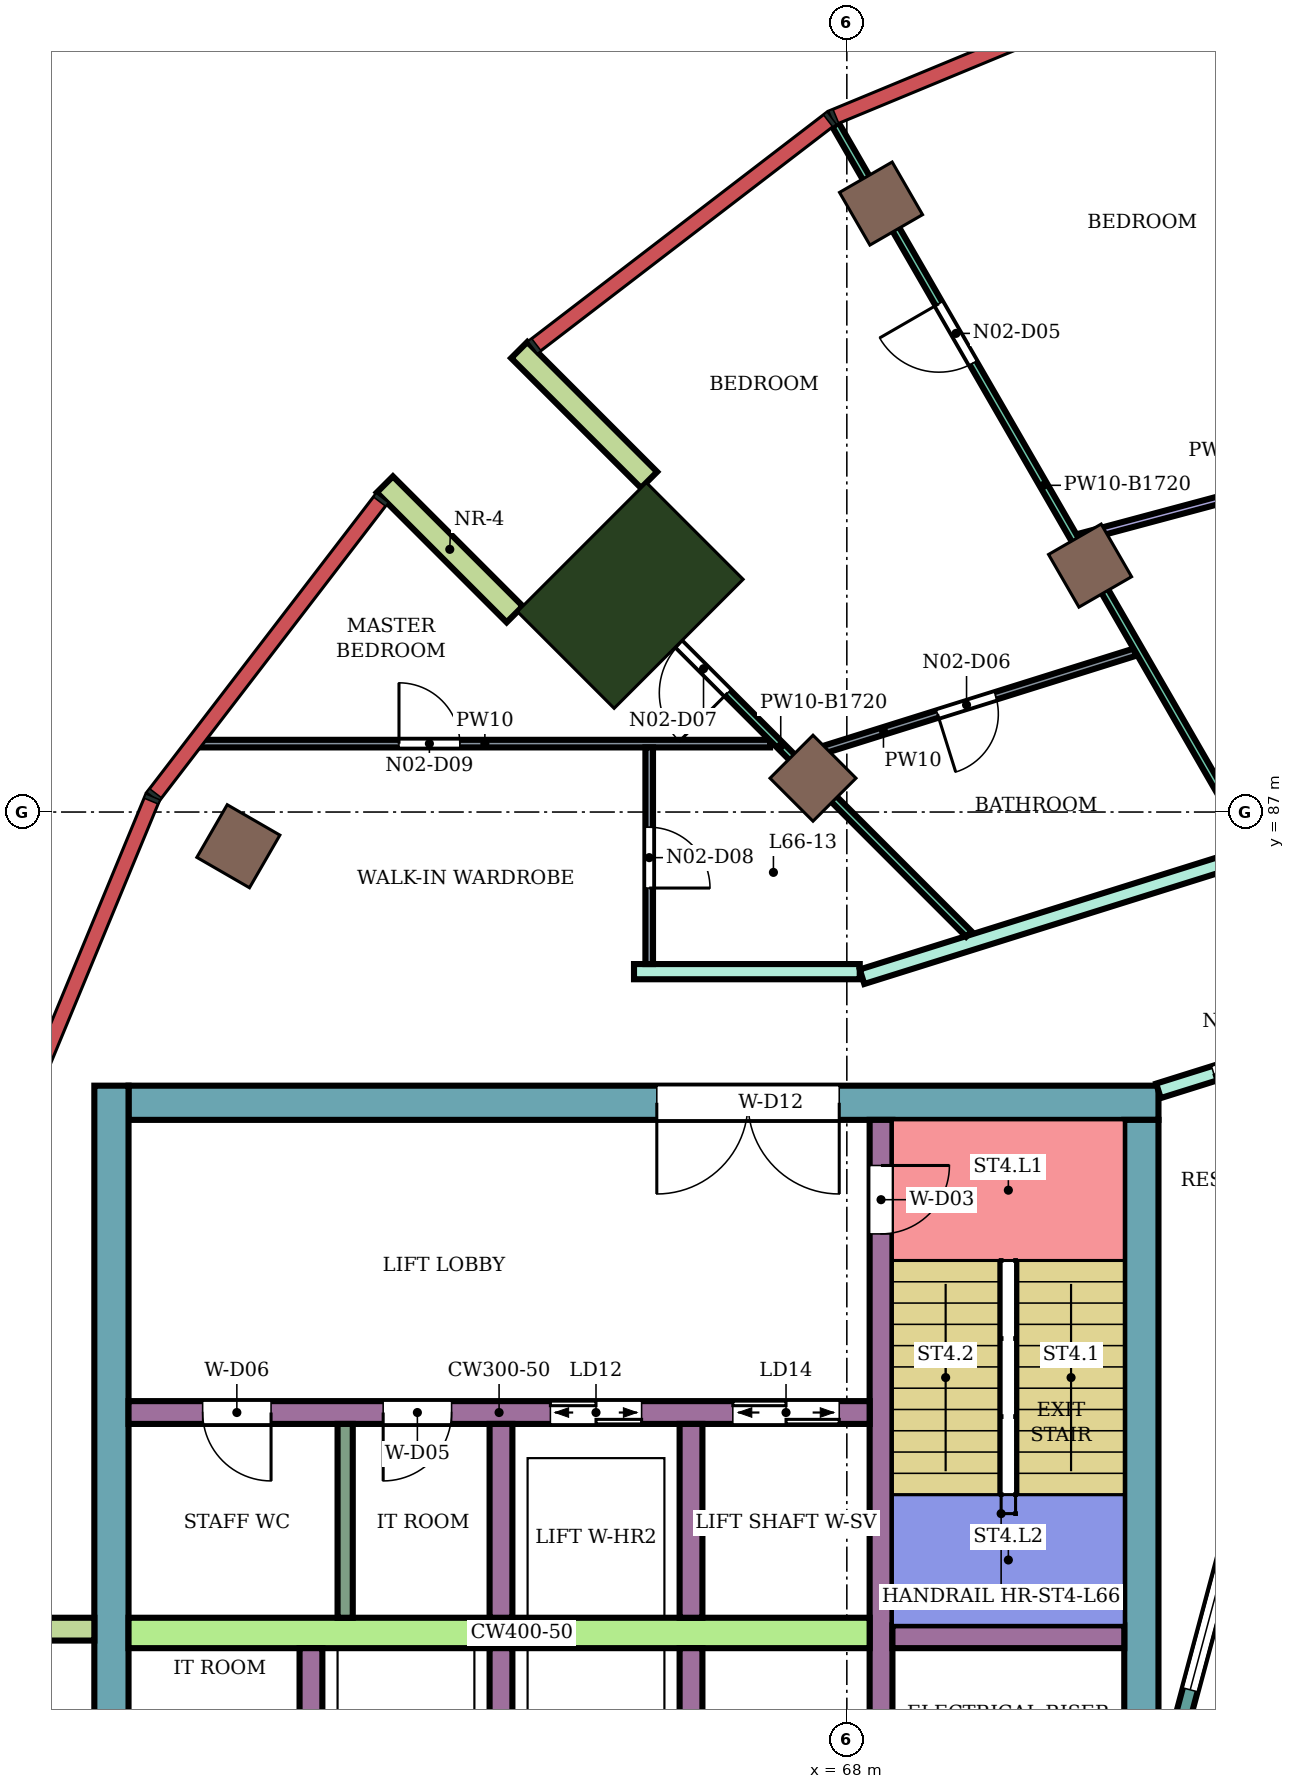
"""IFC4 building model, lengths in metres.
Left out: names, types, materials, properties, quantities, classifications, styles, units other than length and angle.
Written with IfcOpenShell. Run it as: python <this file> out.ifc"""

import sys

from ifc_helpers import new_model, si_unit, direction, frame, frame_2d, origin, origin_2d, place, context, subcontext, project, spatial, rectangle, extrude, element, fill, save


model = new_model("IFC4")
c1 = context("Model", 3, precision=1e-05, world=origin(), true_north=direction((0.0, 1.0)))
c2 = subcontext(c1, "Body", "Model", "MODEL_VIEW")
j1 = project(units=[si_unit("LENGTHUNIT", "METRE"), si_unit("PLANEANGLEUNIT", "RADIAN")], contexts=[c1])
p1 = place(None, origin())
s1 = spatial("IfcSite", under=j1, at=p1, CompositionType="ELEMENT")
p2 = place(p1, origin())
s2 = spatial("IfcBuilding", under=s1, at=p2, CompositionType="ELEMENT")
p3 = place(p2, frame((0.0, 0.0, 288.3)))
s3 = spatial("IfcBuildingStorey", under=s2, at=p3, CompositionType="ELEMENT", Elevation=288.3)
for number, where, z_axis, x_axis in (
    (1, (68.45, 95.005, 0.0), (0.0, 0.0, 1.0), (-0.5, 0.866, 0.0)),
    (2, (59.995, 86.55, 0.0), (0.0, 0.0, 1.0), (-0.866, 0.5, 0.0)),
    (3, (71.2, 90.242, 0.0), (0.0, 0.0, 1.0), (-0.5, 0.866, 0.0)),
    (4, (67.555, 87.445, 0.0), (0.0, 0.0, 1.0), (-0.707, 0.707, 0.0)),
):
    element("IfcColumn", number, at=place(p3, frame(where, z_axis=z_axis, x_axis=x_axis)), inside=s3, PredefinedType="COLUMN", context=c2, shape_type="SweptSolid", body=[
        extrude(rectangle(XDim=0.8, YDim=0.8, at=origin_2d()), origin(), (0.0, 0.0, 1.0), 4.2),
    ])
p4 = place(p3, frame((65.151, 89.849, 0.0), z_axis=(0.0, 0.0, 1.0), x_axis=(-0.707106781187, 0.707106781187, 0.0)))
e5 = element("IfcColumn", 5, at=p4, inside=s3, PredefinedType="COLUMN", context=c2, shape_type="SweptSolid", body=[
    extrude(rectangle(XDim=1.8, YDim=2.4, at=origin_2d()), origin(), (0.0, 0.0, 1.0), 4.2),
])
p5 = place(p3, frame((72.1, 83.175, 0.0), z_axis=(0.0, 0.0, 1.0), x_axis=(-1.0, 0.0, 0.0)))
e6 = element("IfcWall", 6, at=p5, inside=s3, PredefinedType="SHEAR", context=c2, shape_type="SweptSolid", body=[
    extrude(rectangle(XDim=13.55, YDim=0.45, at=frame_2d((6.775, 0.0))), origin(), (0.0, 0.0, 1.0), 3.88),
])
p6 = place(p5, frame((4.2, 0.0, 0.0)))
e7 = element("IfcOpeningElement", 7, at=p6, cuts=e6, PredefinedType="OPENING", context=c2, shape_type="SweptSolid", body=[
    extrude(rectangle(XDim=2.4, YDim=2.4, at=frame_2d((1.2, 1.2))), frame((0.0, 0.235, 0.0), z_axis=(0.0, -1.0, 0.0), x_axis=(1.0, 0.0, 0.0)), (0.0, 0.0, 1.0), 0.47),
])
p7 = place(p3, frame((71.875, 82.95, 0.0), z_axis=(0.0, 0.0, 1.0), x_axis=(0.0, -1.0, 0.0)))
e8 = element("IfcWall", 8, at=p7, inside=s3, PredefinedType="SHEAR", context=c2, shape_type="SweptSolid", body=[
    extrude(rectangle(XDim=7.95, YDim=0.45, at=frame_2d((3.975, 0.0))), origin(), (0.0, 0.0, 1.0), 3.88),
])
p8 = place(p3, frame((58.325, 83.4, 0.0), z_axis=(0.0, 0.0, 1.0), x_axis=(0.0, -1.0, 0.0)))
e9 = element("IfcWall", 9, at=p8, inside=s3, PredefinedType="SHEAR", context=c2, shape_type="SweptSolid", body=[
    extrude(rectangle(XDim=16.8, YDim=0.45, at=frame_2d((8.4, 0.0))), origin(), (0.0, 0.0, 1.0), 3.88),
])
p9 = place(p3, frame((68.45, 82.95, 0.0), z_axis=(0.0, 0.0, 1.0), x_axis=(0.0, -1.0, 0.0)))
e10 = element("IfcWall", 10, at=p9, inside=s3, PredefinedType="SHEAR", context=c2, shape_type="SweptSolid", body=[
    extrude(rectangle(XDim=7.95, YDim=0.3, at=frame_2d((3.975, 0.0))), origin(), (0.0, 0.0, 1.0), 3.88),
])
p10 = place(p9, frame((0.6, 0.0, 0.0)))
e11 = element("IfcOpeningElement", 11, at=p10, cuts=e10, PredefinedType="OPENING", context=c2, shape_type="SweptSolid", body=[
    extrude(rectangle(XDim=0.9, YDim=2.1, at=frame_2d((0.45, 1.05))), frame((0.0, 0.16, 0.0), z_axis=(0.0, -1.0, 0.0), x_axis=(1.0, 0.0, 0.0)), (0.0, 0.0, 1.0), 0.32),
])
p11 = place(p3, frame((71.65, 76.15, 0.0), z_axis=(0.0, 0.0, 1.0), x_axis=(-1.0, 0.0, 0.0)))
e12 = element("IfcWall", 12, at=p11, inside=s3, PredefinedType="SHEAR", context=c2, shape_type="SweptSolid", body=[
    extrude(rectangle(XDim=3.05, YDim=0.3, at=frame_2d((1.525, 0.0))), origin(), (0.0, 0.0, 1.0), 3.88),
])
p12 = place(p3, frame((68.3, 76.2, 0.0), z_axis=(0.0, 0.0, 1.0), x_axis=(-1.0, 0.0, 0.0)))
e13 = element("IfcWall", 13, at=p12, inside=s3, PredefinedType="SHEAR", context=c2, shape_type="SweptSolid", body=[
    extrude(rectangle(XDim=9.75, YDim=0.4, at=frame_2d((4.875, 0.0))), origin(), (0.0, 0.0, 1.0), 3.88),
])
p13 = place(p3, frame((68.3, 79.1, 0.0), z_axis=(0.0, 0.0, 1.0), x_axis=(-1.0, 0.0, 0.0)))
e14 = element("IfcWall", 14, at=p13, inside=s3, PredefinedType="SHEAR", context=c2, shape_type="SweptSolid", body=[
    extrude(rectangle(XDim=9.75, YDim=0.3, at=frame_2d((4.875, 0.0))), origin(), (0.0, 0.0, 1.0), 3.88),
])
p14 = place(p13, frame((0.4, 0.0, 0.0)))
e15 = element("IfcOpeningElement", 15, at=p14, cuts=e14, PredefinedType="OPENING", context=c2, shape_type="SweptSolid", body=[
    extrude(rectangle(XDim=1.4, YDim=2.1, at=frame_2d((0.7, 1.05))), frame((0.0, 0.16, 0.0), z_axis=(0.0, -1.0, 0.0), x_axis=(1.0, 0.0, 0.0)), (0.0, 0.0, 1.0), 0.32),
])
p15 = place(p13, frame((3.0, 0.0, 0.0)))
e16 = element("IfcOpeningElement", 16, at=p15, cuts=e14, PredefinedType="OPENING", context=c2, shape_type="SweptSolid", body=[
    extrude(rectangle(XDim=1.2, YDim=2.1, at=frame_2d((0.6, 1.05))), frame((0.0, 0.16, 0.0), z_axis=(0.0, -1.0, 0.0), x_axis=(1.0, 0.0, 0.0)), (0.0, 0.0, 1.0), 0.32),
])
p16 = place(p13, frame((5.5, 0.0, 0.0)))
e17 = element("IfcOpeningElement", 17, at=p16, cuts=e14, PredefinedType="OPENING", context=c2, shape_type="SweptSolid", body=[
    extrude(rectangle(XDim=0.9, YDim=2.1, at=frame_2d((0.45, 1.05))), frame((0.0, 0.16, 0.0), z_axis=(0.0, -1.0, 0.0), x_axis=(1.0, 0.0, 0.0)), (0.0, 0.0, 1.0), 0.32),
])
p17 = place(p13, frame((7.875, 0.0, 0.0)))
e18 = element("IfcOpeningElement", 18, at=p17, cuts=e14, PredefinedType="OPENING", context=c2, shape_type="SweptSolid", body=[
    extrude(rectangle(XDim=0.9, YDim=2.1, at=frame_2d((0.45, 1.05))), frame((0.0, 0.16, 0.0), z_axis=(0.0, -1.0, 0.0), x_axis=(1.0, 0.0, 0.0)), (0.0, 0.0, 1.0), 0.32),
])
for number, where, z_axis, x_axis in (
    (19, (65.95, 76.0, 0.0), (0.0, 0.0, 1.0), (0.0, -1.0, 0.0)),
    (20, (63.45, 76.0, 0.0), (0.0, 0.0, 1.0), (0.0, -1.0, 0.0)),
    (21, (60.95, 76.0, 0.0), (0.0, 0.0, 1.0), (0.0, -1.0, 0.0)),
    (22, (65.95, 78.95, 0.0), (0.0, 0.0, 1.0), (0.0, -1.0, 0.0)),
    (23, (63.45, 78.95, 0.0), (0.0, 0.0, 1.0), (0.0, -1.0, 0.0)),
):
    element("IfcWall", number, at=place(p3, frame(where, z_axis=z_axis, x_axis=x_axis)), inside=s3, PredefinedType="SHEAR", context=c2, shape_type="SweptSolid", body=[
        extrude(rectangle(XDim=2.55, YDim=0.3, at=frame_2d((1.275, 0.0))), origin(), (0.0, 0.0, 1.0), 3.88),
    ])
for number, where, z_axis, x_axis in (
    (24, (65.398, 91.37, 0.0), (0.0, 0.0, 1.0), (-0.707, 0.707, 0.0)),
    (25, (63.63, 89.602, 0.0), (0.0, 0.0, 1.0), (-0.707, 0.707, 0.0)),
):
    element("IfcWall", number, at=place(p3, frame(where, z_axis=z_axis, x_axis=x_axis)), inside=s3, PredefinedType="NOTDEFINED", context=c2, shape_type="SweptSolid", body=[
        extrude(rectangle(XDim=2.416, YDim=0.3, at=frame_2d((1.208, 0.0))), origin(), (0.0, 0.0, 1.0), 4.2),
    ])
p18 = place(p3, frame((58.1, 76.25, 0.0), z_axis=(0.0, 0.0, 1.0), x_axis=(-1.0, 0.0, 0.0)))
e26 = element("IfcWall", 26, at=p18, inside=s3, PredefinedType="NOTDEFINED", context=c2, shape_type="SweptSolid", body=[
    extrude(rectangle(XDim=2.416, YDim=0.3, at=frame_2d((1.208, 0.0))), origin(), (0.0, 0.0, 1.0), 4.2),
])
p19 = place(p3, frame((73.415, 78.802, 0.0), z_axis=(0.0, 0.0, 1.0), x_axis=(-0.258789828301, -0.965933654434, 0.0)))
e27 = element("IfcWall", 27, at=p19, inside=s3, PredefinedType="NOTDEFINED", context=c2, shape_type="SweptSolid", body=[
    extrude(rectangle(XDim=3.936, YDim=0.2, at=frame_2d((1.968, 0.0))), origin(), (0.0, 0.0, 1.0), 4.2),
])
p20 = place(p19, frame((0.468, 0.0, 0.9)))
e28 = element("IfcOpeningElement", 28, at=p20, cuts=e27, PredefinedType="OPENING", context=c2, shape_type="SweptSolid", body=[
    extrude(rectangle(XDim=3.0, YDim=2.3, at=frame_2d((1.5, 1.15))), frame((0.0, 0.11, 0.0), z_axis=(0.0, -1.0, 0.0), x_axis=(1.0, 0.0, 0.0)), (0.0, 0.0, 1.0), 0.22),
])
p21 = place(p3, frame((65.2, 84.9, 0.0), z_axis=(0.0, 0.0, 1.0), x_axis=(1.0, 0.0, 0.0)))
e29 = element("IfcWall", 29, at=p21, inside=s3, PredefinedType="PARTITIONING", context=c2, shape_type="SweptSolid", body=[
    extrude(rectangle(XDim=2.97, YDim=0.2, at=frame_2d((1.485, 0.0))), origin(), (0.0, 0.0, 1.0), 3.75),
])
p22 = place(p3, frame((68.2, 84.833, 0.0), z_axis=(0.0, 0.0, 1.0), x_axis=(0.954191968402, 0.299195065863, 0.0)))
e30 = element("IfcWall", 30, at=p22, inside=s3, PredefinedType="PARTITIONING", context=c2, shape_type="SweptSolid", body=[
    extrude(rectangle(XDim=5.74, YDim=0.2, at=frame_2d((2.87, 0.0))), origin(), (0.0, 0.0, 1.0), 3.75),
])
p23 = place(p3, frame((72.1, 83.332, 0.0), z_axis=(0.0, 0.0, 1.0), x_axis=(0.954233106619, 0.299063836383, 0.0)))
e31 = element("IfcWall", 31, at=p23, inside=s3, PredefinedType="PARTITIONING", context=c2, shape_type="SweptSolid", body=[
    extrude(rectangle(XDim=2.414, YDim=0.2, at=frame_2d((1.207, 0.0))), origin(), (0.0, 0.0, 1.0), 3.75),
])
p24 = place(p23, frame((0.762, 0.0, 0.0)))
e32 = element("IfcOpeningElement", 32, at=p24, cuts=e31, PredefinedType="OPENING", context=c2, shape_type="SweptSolid", body=[
    extrude(rectangle(XDim=0.9, YDim=2.1, at=frame_2d((0.45, 1.05))), frame((0.0, 0.11, 0.0), z_axis=(0.0, -1.0, 0.0), x_axis=(1.0, 0.0, 0.0)), (0.0, 0.0, 1.0), 0.22),
])
p25 = place(p3, frame((59.486, 87.9, 0.0), z_axis=(0.0, 0.0, 1.0), x_axis=(1.0, 0.0, 0.0)))
e33 = element("IfcWall", 33, at=p25, inside=s3, PredefinedType="PARTITIONING", context=c2, shape_type="SweptSolid", body=[
    extrude(rectangle(XDim=7.504, YDim=0.1, at=frame_2d((3.752, 0.0))), origin(), (0.0, 0.0, 1.0), 3.75),
])
p26 = place(p25, frame((2.622, 0.0, 0.0)))
e34 = element("IfcOpeningElement", 34, at=p26, cuts=e33, PredefinedType="OPENING", context=c2, shape_type="SweptSolid", body=[
    extrude(rectangle(XDim=0.8, YDim=2.1, at=frame_2d((0.4, 1.05))), frame((0.0, 0.06, 0.0), z_axis=(0.0, -1.0, 0.0), x_axis=(1.0, 0.0, 0.0)), (0.0, 0.0, 1.0), 0.12),
])
p27 = place(p3, frame((64.656, 90.344, 0.0), z_axis=(0.0, 0.0, 1.0), x_axis=(0.707106781187, -0.707106781187, 0.0)))
e35 = element("IfcWall", 35, at=p27, inside=s3, PredefinedType="PARTITIONING", context=c2, shape_type="SweptSolid", body=[
    extrude(rectangle(XDim=7.0, YDim=0.1, at=frame_2d((3.5, 0.0))), origin(), (0.0, 0.0, 1.0), 2.48),
])
p28 = place(p27, frame((1.613, 0.0, 0.0)))
e36 = element("IfcOpeningElement", 36, at=p28, cuts=e35, PredefinedType="OPENING", context=c2, shape_type="SweptSolid", body=[
    extrude(rectangle(XDim=0.9, YDim=2.1, at=frame_2d((0.45, 1.05))), frame((0.0, 0.06, 0.0), z_axis=(0.0, -1.0, 0.0), x_axis=(1.0, 0.0, 0.0)), (0.0, 0.0, 1.0), 0.12),
])
p29 = place(p3, frame((65.4, 85.0, 0.0), z_axis=(0.0, 0.0, 1.0), x_axis=(0.0, 1.0, 0.0)))
e37 = element("IfcWall", 37, at=p29, inside=s3, PredefinedType="PARTITIONING", context=c2, shape_type="SweptSolid", body=[
    extrude(rectangle(XDim=2.85, YDim=0.1, at=frame_2d((1.425, 0.0))), origin(), (0.0, 0.0, 1.0), 3.75),
])
p30 = place(p29, frame((1.0, 0.0, 0.0)))
e38 = element("IfcOpeningElement", 38, at=p30, cuts=e37, PredefinedType="OPENING", context=c2, shape_type="SweptSolid", body=[
    extrude(rectangle(XDim=0.8, YDim=2.1, at=frame_2d((0.4, 1.05))), frame((0.0, 0.06, 0.0), z_axis=(0.0, -1.0, 0.0), x_axis=(1.0, 0.0, 0.0)), (0.0, 0.0, 1.0), 0.12),
])
p31 = place(p3, frame((67.379, 87.721, 0.0), z_axis=(0.0, 0.0, 1.0), x_axis=(0.954243762736, 0.299029833426, 0.0)))
e39 = element("IfcWall", 39, at=p31, inside=s3, PredefinedType="PARTITIONING", context=c2, shape_type="SweptSolid", body=[
    extrude(rectangle(XDim=4.622, YDim=0.1, at=frame_2d((2.311, 0.0))), origin(), (0.0, 0.0, 1.0), 3.75),
])
p32 = place(p31, frame((1.901, 0.0, 0.0)))
e40 = element("IfcOpeningElement", 40, at=p32, cuts=e39, PredefinedType="OPENING", context=c2, shape_type="SweptSolid", body=[
    extrude(rectangle(XDim=0.8, YDim=2.1, at=frame_2d((0.4, 1.05))), frame((0.0, 0.06, 0.0), z_axis=(0.0, -1.0, 0.0), x_axis=(1.0, 0.0, 0.0)), (0.0, 0.0, 1.0), 0.12),
])
p33 = place(p3, frame((67.851, 96.042, 0.0), z_axis=(0.0, 0.0, 1.0), x_axis=(0.499990581918, -0.866030841248, 0.0)))
e41 = element("IfcWall", 41, at=p33, inside=s3, PredefinedType="PARTITIONING", context=c2, shape_type="SweptSolid", body=[
    extrude(rectangle(XDim=10.956, YDim=0.1, at=frame_2d((5.478, 0.0))), origin(), (0.0, 0.0, 1.0), 2.48),
])
p34 = place(p33, frame((2.72, 0.0, 0.0)))
e42 = element("IfcOpeningElement", 42, at=p34, cuts=e41, PredefinedType="OPENING", context=c2, shape_type="SweptSolid", body=[
    extrude(rectangle(XDim=0.9, YDim=2.1, at=frame_2d((0.45, 1.05))), frame((0.0, 0.06, 0.0), z_axis=(0.0, -1.0, 0.0), x_axis=(1.0, 0.0, 0.0)), (0.0, 0.0, 1.0), 0.12),
])
p35 = place(p3, frame((71.054, 90.611, 0.0), z_axis=(0.0, 0.0, 1.0), x_axis=(0.965944938819, 0.258747705633, 0.0)))
e43 = element("IfcWall", 43, at=p35, inside=s3, PredefinedType="PARTITIONING", context=c2, shape_type="SweptSolid", body=[
    extrude(rectangle(XDim=4.551, YDim=0.1, at=frame_2d((2.275, 0.0))), origin(), (0.0, 0.0, 1.0), 3.38),
])
p36 = place(p3, frame((61.4, 78.95, 0.0), z_axis=(0.0, 0.0, 1.0), x_axis=(0.0, -1.0, 0.0)))
e44 = element("IfcWall", 44, at=p36, inside=s3, PredefinedType="PARTITIONING", context=c2, shape_type="SweptSolid", body=[
    extrude(rectangle(XDim=2.55, YDim=0.2, at=frame_2d((1.275, 0.0))), origin(), (0.0, 0.0, 1.0), 3.88),
])
p37 = place(p20, origin())
e45 = element("IfcWindow", 45, at=p37, inside=s3, PartitioningType="SINGLE_PANEL", PredefinedType="WINDOW", context=c2, shape_type="SweptSolid", body=[
    extrude(rectangle(XDim=3.0, YDim=2.3, at=frame_2d((1.5, 1.15))), frame((0.0, 0.03, 0.0), z_axis=(0.0, -1.0, 0.0), x_axis=(1.0, 0.0, 0.0)), (0.0, 0.0, 1.0), 0.06),
])
fill(e28, e45)
p38 = place(p34, frame((0.9, 0.0, 0.0), z_axis=(0.0, 0.0, 1.0), x_axis=(-1.0, 0.0, 0.0)))
e46 = element("IfcDoor", 46, at=p38, inside=s3, OperationType="SINGLE_SWING_RIGHT", PredefinedType="DOOR", context=c2, shape_type="SweptSolid", body=[
    extrude(rectangle(XDim=0.9, YDim=2.1, at=frame_2d((0.45, 1.05))), frame((0.0, 0.025, 0.0), z_axis=(0.0, -1.0, 0.0), x_axis=(1.0, 0.0, 0.0)), (0.0, 0.0, 1.0), 0.05),
])
fill(e42, e46)
p39 = place(p32, frame((0.8, 0.0, 0.0), z_axis=(0.0, 0.0, 1.0), x_axis=(-1.0, 0.0, 0.0)))
e47 = element("IfcDoor", 47, at=p39, inside=s3, OperationType="SINGLE_SWING_RIGHT", PredefinedType="DOOR", context=c2, shape_type="SweptSolid", body=[
    extrude(rectangle(XDim=0.8, YDim=2.1, at=frame_2d((0.4, 1.05))), frame((0.0, 0.025, 0.0), z_axis=(0.0, -1.0, 0.0), x_axis=(1.0, 0.0, 0.0)), (0.0, 0.0, 1.0), 0.05),
])
fill(e40, e47)
p40 = place(p28, frame((0.9, 0.0, 0.0), z_axis=(0.0, 0.0, 1.0), x_axis=(-1.0, 0.0, 0.0)))
e48 = element("IfcDoor", 48, at=p40, inside=s3, OperationType="SINGLE_SWING_LEFT", PredefinedType="DOOR", context=c2, shape_type="SweptSolid", body=[
    extrude(rectangle(XDim=0.9, YDim=2.1, at=frame_2d((0.45, 1.05))), frame((0.0, 0.025, 0.0), z_axis=(0.0, -1.0, 0.0), x_axis=(1.0, 0.0, 0.0)), (0.0, 0.0, 1.0), 0.05),
])
fill(e36, e48)
p41 = place(p30, frame((0.8, 0.0, 0.0), z_axis=(0.0, 0.0, 1.0), x_axis=(-1.0, 0.0, 0.0)))
e49 = element("IfcDoor", 49, at=p41, inside=s3, OperationType="SINGLE_SWING_RIGHT", PredefinedType="DOOR", context=c2, shape_type="SweptSolid", body=[
    extrude(rectangle(XDim=0.8, YDim=2.1, at=frame_2d((0.4, 1.05))), frame((0.0, 0.025, 0.0), z_axis=(0.0, -1.0, 0.0), x_axis=(1.0, 0.0, 0.0)), (0.0, 0.0, 1.0), 0.05),
])
fill(e38, e49)
p42 = place(p26, origin())
e50 = element("IfcDoor", 50, at=p42, inside=s3, OperationType="SINGLE_SWING_LEFT", PredefinedType="DOOR", context=c2, shape_type="SweptSolid", body=[
    extrude(rectangle(XDim=0.8, YDim=2.1, at=frame_2d((0.4, 1.05))), frame((0.0, 0.025, 0.0), z_axis=(0.0, -1.0, 0.0), x_axis=(1.0, 0.0, 0.0)), (0.0, 0.0, 1.0), 0.05),
])
fill(e34, e50)
p43 = place(p24, frame((0.9, 0.0, 0.0), z_axis=(0.0, 0.0, 1.0), x_axis=(-1.0, 0.0, 0.0)))
e51 = element("IfcDoor", 51, at=p43, inside=s3, OperationType="SINGLE_SWING_RIGHT", PredefinedType="DOOR", context=c2, shape_type="SweptSolid", body=[
    extrude(rectangle(XDim=0.9, YDim=2.1, at=frame_2d((0.45, 1.05))), frame((0.0, 0.025, 0.0), z_axis=(0.0, -1.0, 0.0), x_axis=(1.0, 0.0, 0.0)), (0.0, 0.0, 1.0), 0.05),
])
fill(e32, e51)
p44 = place(p10, origin())
e52 = element("IfcDoor", 52, at=p44, inside=s3, OperationType="SINGLE_SWING_LEFT", PredefinedType="DOOR", context=c2, shape_type="SweptSolid", body=[
    extrude(rectangle(XDim=0.9, YDim=2.1, at=frame_2d((0.45, 1.05))), frame((0.0, 0.025, 0.0), z_axis=(0.0, -1.0, 0.0), x_axis=(1.0, 0.0, 0.0)), (0.0, 0.0, 1.0), 0.05),
])
fill(e11, e52)
p45 = place(p14, origin())
e53 = element("IfcDoor", 53, at=p45, inside=s3, OperationType="DOUBLE_DOOR_SLIDING", PredefinedType="DOOR", context=c2, shape_type="SweptSolid", body=[
    extrude(rectangle(XDim=1.4, YDim=2.1, at=frame_2d((0.7, 1.05))), frame((0.0, 0.025, 0.0), z_axis=(0.0, -1.0, 0.0), x_axis=(1.0, 0.0, 0.0)), (0.0, 0.0, 1.0), 0.05),
])
fill(e15, e53)
p46 = place(p15, origin())
e54 = element("IfcDoor", 54, at=p46, inside=s3, OperationType="DOUBLE_DOOR_SLIDING", PredefinedType="DOOR", context=c2, shape_type="SweptSolid", body=[
    extrude(rectangle(XDim=1.2, YDim=2.1, at=frame_2d((0.6, 1.05))), frame((0.0, 0.025, 0.0), z_axis=(0.0, -1.0, 0.0), x_axis=(1.0, 0.0, 0.0)), (0.0, 0.0, 1.0), 0.05),
])
fill(e16, e54)
p47 = place(p16, origin())
e55 = element("IfcDoor", 55, at=p47, inside=s3, OperationType="SINGLE_SWING_RIGHT", PredefinedType="DOOR", context=c2, shape_type="SweptSolid", body=[
    extrude(rectangle(XDim=0.9, YDim=2.1, at=frame_2d((0.45, 1.05))), frame((0.0, 0.025, 0.0), z_axis=(0.0, -1.0, 0.0), x_axis=(1.0, 0.0, 0.0)), (0.0, 0.0, 1.0), 0.05),
])
fill(e17, e55)
p48 = place(p17, origin())
e56 = element("IfcDoor", 56, at=p48, inside=s3, OperationType="SINGLE_SWING_LEFT", PredefinedType="DOOR", context=c2, shape_type="SweptSolid", body=[
    extrude(rectangle(XDim=0.9, YDim=2.1, at=frame_2d((0.45, 1.05))), frame((0.0, 0.025, 0.0), z_axis=(0.0, -1.0, 0.0), x_axis=(1.0, 0.0, 0.0)), (0.0, 0.0, 1.0), 0.05),
])
fill(e18, e56)
p49 = place(p6, origin())
e57 = element("IfcDoor", 57, at=p49, inside=s3, OperationType="DOUBLE_DOOR_SINGLE_SWING", PredefinedType="DOOR", context=c2, shape_type="SweptSolid", body=[
    extrude(rectangle(XDim=2.4, YDim=2.4, at=frame_2d((1.2, 1.2))), frame((0.0, 0.025, 0.0), z_axis=(0.0, -1.0, 0.0), x_axis=(1.0, 0.0, 0.0)), (0.0, 0.0, 1.0), 0.05),
])
fill(e7, e57)
save(model, sys.argv[1])
